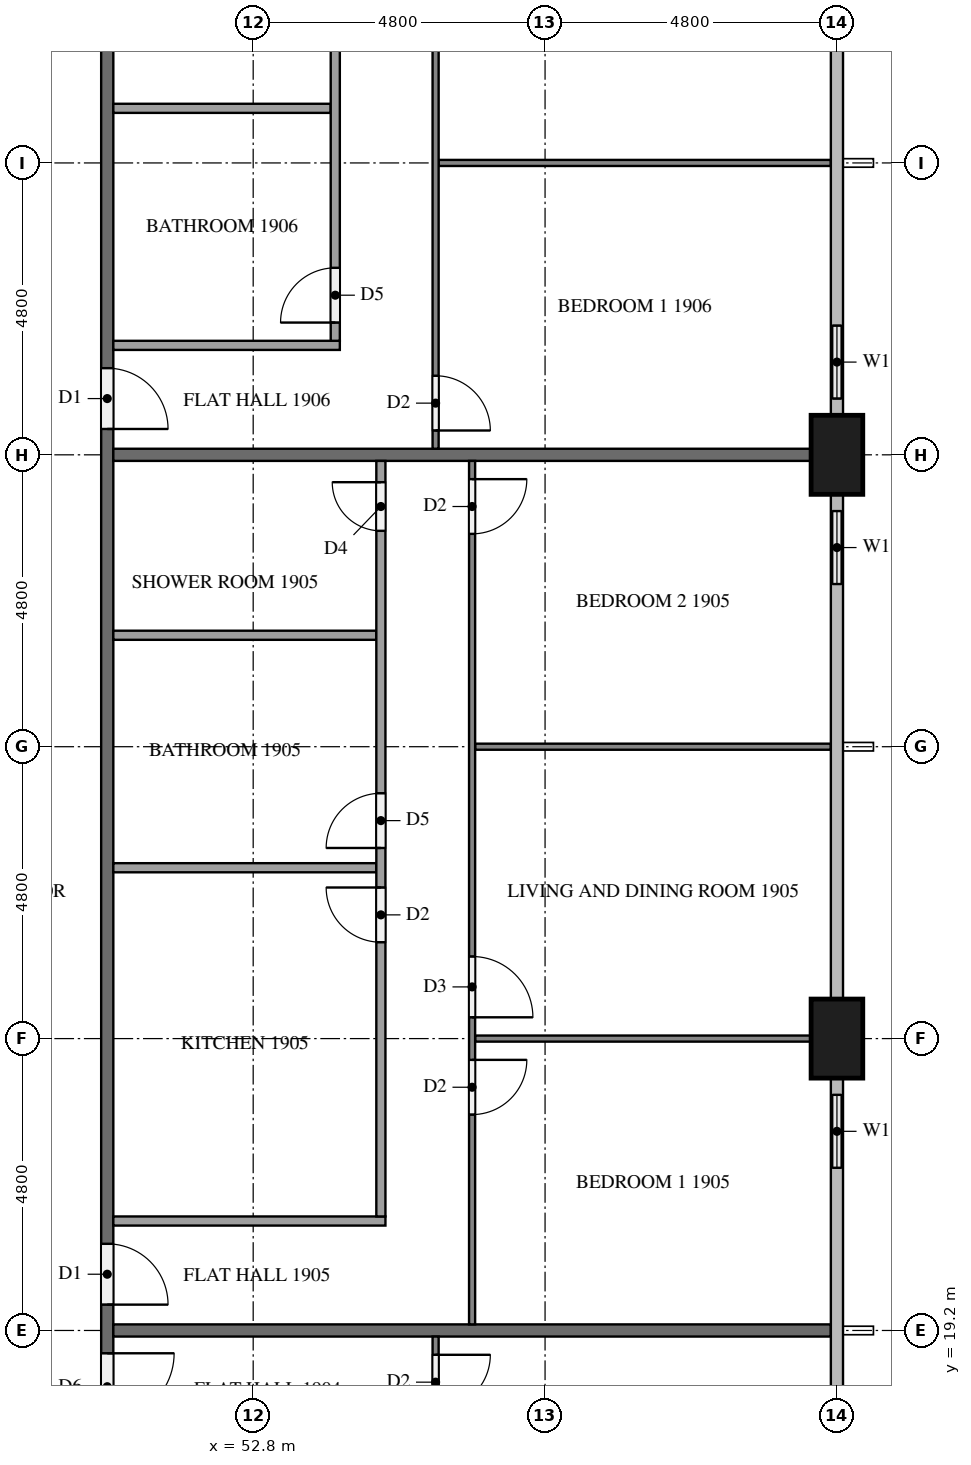
"""IFC4 building model, lengths in metres.
Left out: names, types, materials, properties, quantities, classifications, styles, units other than length and angle.
Written with IfcOpenShell. Run it as: python <this file> out.ifc"""

import sys

from ifc_helpers import new_model, si_unit, direction, frame, frame_2d, origin, origin_2d, place, context, subcontext, project, spatial, rectangle, extrude, element, fill, save


model = new_model("IFC4")
c1 = context("Model", 3, precision=1e-05, world=origin(), true_north=direction((0.0, 1.0)))
c2 = subcontext(c1, "Body", "Model", "MODEL_VIEW")
j1 = project(units=[si_unit("LENGTHUNIT", "METRE"), si_unit("PLANEANGLEUNIT", "RADIAN")], contexts=[c1])
p1 = place(None, origin())
s1 = spatial("IfcSite", under=j1, at=p1, CompositionType="ELEMENT")
p2 = place(p1, origin())
s2 = spatial("IfcBuilding", under=s1, at=p2, CompositionType="ELEMENT")
p3 = place(p2, frame((0.0, 0.0, 76.8)))
s3 = spatial("IfcBuildingStorey", under=s2, at=p3, CompositionType="ELEMENT", Elevation=76.8)
for number, where, z_axis, x_axis in (
    (1, (62.4, 24.0, 0.0), (0.0, 0.0, 1.0), (0.0, 1.0, 0.0)),
    (2, (62.4, 33.6, 0.0), (0.0, 0.0, 1.0), (0.0, 1.0, 0.0)),
):
    element("IfcColumn", number, at=place(p3, frame(where, z_axis=z_axis, x_axis=x_axis)), inside=s3, PredefinedType="COLUMN", context=c2, shape_type="SweptSolid", body=[
        extrude(rectangle(XDim=1.3, YDim=0.85, at=origin_2d()), origin(), (0.0, 0.0, 1.0), 3.2),
    ])
p4 = place(p3, frame((62.4, 21.6, 0.0), z_axis=(0.0, 0.0, 1.0), x_axis=(0.0, 1.0, 0.0)))
e3 = element("IfcWall", 3, at=p4, inside=s3, PredefinedType="SOLIDWALL", context=c2, shape_type="SweptSolid", body=[
    extrude(rectangle(XDim=1.75, YDim=0.15, at=frame_2d((0.875, 0.0))), origin(), (0.0, 0.0, 1.0), 3.2),
])
p5 = place(p4, frame((0.275, 0.0, 0.9)))
e4 = element("IfcOpeningElement", 4, at=p5, cuts=e3, PredefinedType="OPENING", context=c2, shape_type="SweptSolid", body=[
    extrude(rectangle(XDim=1.2, YDim=1.4, at=frame_2d((0.6, 0.7))), frame((0.0, 0.085, 0.0), z_axis=(0.0, -1.0, 0.0), x_axis=(1.0, 0.0, 0.0)), (0.0, 0.0, 1.0), 0.17),
])
p6 = place(p3, frame((62.4, 31.2, 0.0), z_axis=(0.0, 0.0, 1.0), x_axis=(0.0, 1.0, 0.0)))
e5 = element("IfcWall", 5, at=p6, inside=s3, PredefinedType="SOLIDWALL", context=c2, shape_type="SweptSolid", body=[
    extrude(rectangle(XDim=1.75, YDim=0.15, at=frame_2d((0.875, 0.0))), origin(), (0.0, 0.0, 1.0), 3.2),
])
p7 = place(p6, frame((0.275, 0.0, 0.9)))
e6 = element("IfcOpeningElement", 6, at=p7, cuts=e5, PredefinedType="OPENING", context=c2, shape_type="SweptSolid", body=[
    extrude(rectangle(XDim=1.2, YDim=1.4, at=frame_2d((0.6, 0.7))), frame((0.0, 0.085, 0.0), z_axis=(0.0, -1.0, 0.0), x_axis=(1.0, 0.0, 0.0)), (0.0, 0.0, 1.0), 0.17),
])
p8 = place(p3, frame((62.4, 34.25, 0.0), z_axis=(0.0, 0.0, 1.0), x_axis=(0.0, 1.0, 0.0)))
e7 = element("IfcWall", 7, at=p8, inside=s3, PredefinedType="SOLIDWALL", context=c2, shape_type="SweptSolid", body=[
    extrude(rectangle(XDim=1.75, YDim=0.15, at=frame_2d((0.875, 0.0))), origin(), (0.0, 0.0, 1.0), 3.2),
])
p9 = place(p8, frame((0.275, 0.0, 0.9)))
e8 = element("IfcOpeningElement", 8, at=p9, cuts=e7, PredefinedType="OPENING", context=c2, shape_type="SweptSolid", body=[
    extrude(rectangle(XDim=1.2, YDim=1.4, at=frame_2d((0.6, 0.7))), frame((0.0, 0.085, 0.0), z_axis=(0.0, -1.0, 0.0), x_axis=(1.0, 0.0, 0.0)), (0.0, 0.0, 1.0), 0.17),
])
p10 = place(p3, frame((50.4, 40.7, 0.0), z_axis=(0.0, 0.0, 1.0), x_axis=(0.0, -1.0, 0.0)))
e9 = element("IfcWall", 9, at=p10, inside=s3, PredefinedType="PARTITIONING", context=c2, shape_type="SweptSolid", body=[
    extrude(rectangle(XDim=28.6, YDim=0.2, at=frame_2d((14.3, 0.0))), origin(), (0.0, 0.0, 1.0), 3.2),
])
p11 = place(p10, frame((21.875, 0.0, 0.0)))
e10 = element("IfcOpeningElement", 10, at=p11, cuts=e9, PredefinedType="OPENING", context=c2, shape_type="SweptSolid", body=[
    extrude(rectangle(XDim=1.1, YDim=2.1, at=frame_2d((0.55, 1.05))), frame((0.0, 0.11, 0.0), z_axis=(0.0, -1.0, 0.0), x_axis=(1.0, 0.0, 0.0)), (0.0, 0.0, 1.0), 0.22),
])
p12 = place(p10, frame((20.075, 0.0, 0.0)))
e11 = element("IfcOpeningElement", 11, at=p12, cuts=e9, PredefinedType="OPENING", context=c2, shape_type="SweptSolid", body=[
    extrude(rectangle(XDim=1.0, YDim=2.1, at=frame_2d((0.5, 1.05))), frame((0.0, 0.11, 0.0), z_axis=(0.0, -1.0, 0.0), x_axis=(1.0, 0.0, 0.0)), (0.0, 0.0, 1.0), 0.22),
])
p13 = place(p10, frame((5.675, 0.0, 0.0)))
e12 = element("IfcOpeningElement", 12, at=p13, cuts=e9, PredefinedType="OPENING", context=c2, shape_type="SweptSolid", body=[
    extrude(rectangle(XDim=1.0, YDim=2.1, at=frame_2d((0.5, 1.05))), frame((0.0, 0.11, 0.0), z_axis=(0.0, -1.0, 0.0), x_axis=(1.0, 0.0, 0.0)), (0.0, 0.0, 1.0), 0.22),
])
p14 = place(p3, frame((50.5, 19.2, 0.0), z_axis=(0.0, 0.0, 1.0), x_axis=(1.0, 0.0, 0.0)))
e13 = element("IfcWall", 13, at=p14, inside=s3, PredefinedType="PARTITIONING", context=c2, shape_type="SweptSolid", body=[
    extrude(rectangle(XDim=11.8, YDim=0.2, at=frame_2d((5.9, 0.0))), origin(), (0.0, 0.0, 1.0), 3.2),
])
p15 = place(p3, frame((50.5, 33.6, 0.0), z_axis=(0.0, 0.0, 1.0), x_axis=(1.0, 0.0, 0.0)))
e14 = element("IfcWall", 14, at=p15, inside=s3, PredefinedType="PARTITIONING", context=c2, shape_type="SweptSolid", body=[
    extrude(rectangle(XDim=11.475, YDim=0.2, at=frame_2d((5.738, 0.0))), origin(), (0.0, 0.0, 1.0), 3.2),
])
p16 = place(p3, frame((55.8, 19.1, 0.0), z_axis=(0.0, 0.0, 1.0), x_axis=(0.0, -1.0, 0.0)))
e15 = element("IfcWall", 15, at=p16, inside=s3, PredefinedType="PARTITIONING", context=c2, shape_type="SweptSolid", body=[
    extrude(rectangle(XDim=19.0, YDim=0.1, at=frame_2d((9.5, 0.0))), origin(), (0.0, 0.0, 1.0), 3.2),
])
p17 = place(p16, frame((0.3, 0.0, 0.0)))
e16 = element("IfcOpeningElement", 16, at=p17, cuts=e15, PredefinedType="OPENING", context=c2, shape_type="SweptSolid", body=[
    extrude(rectangle(XDim=0.9, YDim=2.1, at=frame_2d((0.45, 1.05))), frame((0.0, 0.06, 0.0), z_axis=(0.0, -1.0, 0.0), x_axis=(1.0, 0.0, 0.0)), (0.0, 0.0, 1.0), 0.12),
])
p18 = place(p16, frame((8.15, 0.0, 0.0)))
e17 = element("IfcOpeningElement", 17, at=p18, cuts=e15, PredefinedType="OPENING", context=c2, shape_type="SweptSolid", body=[
    extrude(rectangle(XDim=1.0, YDim=2.1, at=frame_2d((0.5, 1.05))), frame((0.0, 0.06, 0.0), z_axis=(0.0, -1.0, 0.0), x_axis=(1.0, 0.0, 0.0)), (0.0, 0.0, 1.0), 0.12),
])
p19 = place(p16, frame((9.85, 0.0, 0.0)))
e18 = element("IfcOpeningElement", 18, at=p19, cuts=e15, PredefinedType="OPENING", context=c2, shape_type="SweptSolid", body=[
    extrude(rectangle(XDim=0.9, YDim=2.1, at=frame_2d((0.45, 1.05))), frame((0.0, 0.06, 0.0), z_axis=(0.0, -1.0, 0.0), x_axis=(1.0, 0.0, 0.0)), (0.0, 0.0, 1.0), 0.12),
])
p20 = place(p16, frame((17.6, 0.0, 0.0)))
e19 = element("IfcOpeningElement", 19, at=p20, cuts=e15, PredefinedType="OPENING", context=c2, shape_type="SweptSolid", body=[
    extrude(rectangle(XDim=0.9, YDim=2.1, at=frame_2d((0.45, 1.05))), frame((0.0, 0.06, 0.0), z_axis=(0.0, -1.0, 0.0), x_axis=(1.0, 0.0, 0.0)), (0.0, 0.0, 1.0), 0.12),
])
p21 = place(p3, frame((56.45, 24.0, 0.0), z_axis=(0.0, 0.0, 1.0), x_axis=(1.0, 0.0, 0.0)))
e20 = element("IfcWall", 20, at=p21, inside=s3, PredefinedType="PARTITIONING", context=c2, shape_type="SweptSolid", body=[
    extrude(rectangle(XDim=5.525, YDim=0.1, at=frame_2d((2.763, 0.0))), origin(), (0.0, 0.0, 1.0), 3.2),
])
p22 = place(p3, frame((56.45, 28.8, 0.0), z_axis=(0.0, 0.0, 1.0), x_axis=(1.0, 0.0, 0.0)))
e21 = element("IfcWall", 21, at=p22, inside=s3, PredefinedType="PARTITIONING", context=c2, shape_type="SweptSolid", body=[
    extrude(rectangle(XDim=5.85, YDim=0.1, at=frame_2d((2.925, 0.0))), origin(), (0.0, 0.0, 1.0), 3.2),
])
p23 = place(p3, frame((56.4, 33.5, 0.0), z_axis=(0.0, 0.0, 1.0), x_axis=(0.0, -1.0, 0.0)))
e22 = element("IfcWall", 22, at=p23, inside=s3, PredefinedType="PARTITIONING", context=c2, shape_type="SweptSolid", body=[
    extrude(rectangle(XDim=14.2, YDim=0.1, at=frame_2d((7.1, 0.0))), origin(), (0.0, 0.0, 1.0), 3.2),
])
p24 = place(p23, frame((9.85, 0.0, 0.0)))
e23 = element("IfcOpeningElement", 23, at=p24, cuts=e22, PredefinedType="OPENING", context=c2, shape_type="SweptSolid", body=[
    extrude(rectangle(XDim=0.9, YDim=2.1, at=frame_2d((0.45, 1.05))), frame((0.0, 0.06, 0.0), z_axis=(0.0, -1.0, 0.0), x_axis=(1.0, 0.0, 0.0)), (0.0, 0.0, 1.0), 0.12),
])
p25 = place(p23, frame((8.15, 0.0, 0.0)))
e24 = element("IfcOpeningElement", 24, at=p25, cuts=e22, PredefinedType="OPENING", context=c2, shape_type="SweptSolid", body=[
    extrude(rectangle(XDim=1.0, YDim=2.1, at=frame_2d((0.5, 1.05))), frame((0.0, 0.06, 0.0), z_axis=(0.0, -1.0, 0.0), x_axis=(1.0, 0.0, 0.0)), (0.0, 0.0, 1.0), 0.12),
])
p26 = place(p23, frame((0.3, 0.0, 0.0)))
e25 = element("IfcOpeningElement", 25, at=p26, cuts=e22, PredefinedType="OPENING", context=c2, shape_type="SweptSolid", body=[
    extrude(rectangle(XDim=0.9, YDim=2.1, at=frame_2d((0.45, 1.05))), frame((0.0, 0.06, 0.0), z_axis=(0.0, -1.0, 0.0), x_axis=(1.0, 0.0, 0.0)), (0.0, 0.0, 1.0), 0.12),
])
for number, where, z_axis, x_axis in (
    (26, (50.5, 26.81, 0.0), (0.0, 0.0, 1.0), (1.0, 0.0, 0.0)),
    (27, (50.5, 30.633, 0.0), (0.0, 0.0, 1.0), (1.0, 0.0, 0.0)),
):
    element("IfcWall", number, at=place(p3, frame(where, z_axis=z_axis, x_axis=x_axis)), inside=s3, PredefinedType="PARTITIONING", context=c2, shape_type="SweptSolid", body=[
        extrude(rectangle(XDim=4.325, YDim=0.15, at=frame_2d((2.163, 0.0))), origin(), (0.0, 0.0, 1.0), 3.2),
    ])
p27 = place(p3, frame((50.5, 21.0, 0.0), z_axis=(0.0, 0.0, 1.0), x_axis=(1.0, 0.0, 0.0)))
e28 = element("IfcWall", 28, at=p27, inside=s3, PredefinedType="PARTITIONING", context=c2, shape_type="SweptSolid", body=[
    extrude(rectangle(XDim=4.475, YDim=0.15, at=frame_2d((2.238, 0.0))), origin(), (0.0, 0.0, 1.0), 3.2),
])
p28 = place(p3, frame((54.9, 21.075, 0.0), z_axis=(0.0, 0.0, 1.0), x_axis=(0.0, 1.0, 0.0)))
e29 = element("IfcWall", 29, at=p28, inside=s3, PredefinedType="PARTITIONING", context=c2, shape_type="SweptSolid", body=[
    extrude(rectangle(XDim=12.425, YDim=0.15, at=frame_2d((6.212, 0.0))), origin(), (0.0, 0.0, 1.0), 3.2),
])
p29 = place(p28, frame((4.51, 0.0, 0.0)))
e30 = element("IfcOpeningElement", 30, at=p29, cuts=e29, PredefinedType="OPENING", context=c2, shape_type="SweptSolid", body=[
    extrude(rectangle(XDim=0.9, YDim=2.1, at=frame_2d((0.45, 1.05))), frame((0.0, 0.085, 0.0), z_axis=(0.0, -1.0, 0.0), x_axis=(1.0, 0.0, 0.0)), (0.0, 0.0, 1.0), 0.17),
])
p30 = place(p28, frame((6.06, 0.0, 0.0)))
e31 = element("IfcOpeningElement", 31, at=p30, cuts=e29, PredefinedType="OPENING", context=c2, shape_type="SweptSolid", body=[
    extrude(rectangle(XDim=0.9, YDim=2.1, at=frame_2d((0.45, 1.05))), frame((0.0, 0.085, 0.0), z_axis=(0.0, -1.0, 0.0), x_axis=(1.0, 0.0, 0.0)), (0.0, 0.0, 1.0), 0.17),
])
p31 = place(p28, frame((11.275, 0.0, 0.0)))
e32 = element("IfcOpeningElement", 32, at=p31, cuts=e29, PredefinedType="OPENING", context=c2, shape_type="SweptSolid", body=[
    extrude(rectangle(XDim=0.8, YDim=2.1, at=frame_2d((0.4, 1.05))), frame((0.0, 0.085, 0.0), z_axis=(0.0, -1.0, 0.0), x_axis=(1.0, 0.0, 0.0)), (0.0, 0.0, 1.0), 0.17),
])
p32 = place(p3, frame((55.85, 38.4, 0.0), z_axis=(0.0, 0.0, 1.0), x_axis=(1.0, 0.0, 0.0)))
e33 = element("IfcWall", 33, at=p32, inside=s3, PredefinedType="PARTITIONING", context=c2, shape_type="SweptSolid", body=[
    extrude(rectangle(XDim=6.45, YDim=0.1, at=frame_2d((3.225, 0.0))), origin(), (0.0, 0.0, 1.0), 3.2),
])
p33 = place(p3, frame((55.8, 47.9, 0.0), z_axis=(0.0, 0.0, 1.0), x_axis=(0.0, -1.0, 0.0)))
e34 = element("IfcWall", 34, at=p33, inside=s3, PredefinedType="PARTITIONING", context=c2, shape_type="SweptSolid", body=[
    extrude(rectangle(XDim=14.2, YDim=0.1, at=frame_2d((7.1, 0.0))), origin(), (0.0, 0.0, 1.0), 3.2),
])
p34 = place(p33, frame((13.0, 0.0, 0.0)))
e35 = element("IfcOpeningElement", 35, at=p34, cuts=e34, PredefinedType="OPENING", context=c2, shape_type="SweptSolid", body=[
    extrude(rectangle(XDim=0.9, YDim=2.1, at=frame_2d((0.45, 1.05))), frame((0.0, 0.06, 0.0), z_axis=(0.0, -1.0, 0.0), x_axis=(1.0, 0.0, 0.0)), (0.0, 0.0, 1.0), 0.12),
])
p35 = place(p33, frame((5.05, 0.0, 0.0)))
e36 = element("IfcOpeningElement", 36, at=p35, cuts=e34, PredefinedType="OPENING", context=c2, shape_type="SweptSolid", body=[
    extrude(rectangle(XDim=0.9, YDim=2.1, at=frame_2d((0.45, 1.05))), frame((0.0, 0.06, 0.0), z_axis=(0.0, -1.0, 0.0), x_axis=(1.0, 0.0, 0.0)), (0.0, 0.0, 1.0), 0.12),
])
p36 = place(p33, frame((3.35, 0.0, 0.0)))
e37 = element("IfcOpeningElement", 37, at=p36, cuts=e34, PredefinedType="OPENING", context=c2, shape_type="SweptSolid", body=[
    extrude(rectangle(XDim=1.0, YDim=2.1, at=frame_2d((0.5, 1.05))), frame((0.0, 0.06, 0.0), z_axis=(0.0, -1.0, 0.0), x_axis=(1.0, 0.0, 0.0)), (0.0, 0.0, 1.0), 0.12),
])
p37 = place(p3, frame((50.5, 39.298, 0.0), z_axis=(0.0, 0.0, 1.0), x_axis=(1.0, 0.0, 0.0)))
e38 = element("IfcWall", 38, at=p37, inside=s3, PredefinedType="PARTITIONING", context=c2, shape_type="SweptSolid", body=[
    extrude(rectangle(XDim=3.575, YDim=0.15, at=frame_2d((1.788, 0.0))), origin(), (0.0, 0.0, 1.0), 3.2),
])
p38 = place(p3, frame((50.5, 35.4, 0.0), z_axis=(0.0, 0.0, 1.0), x_axis=(1.0, 0.0, 0.0)))
e39 = element("IfcWall", 39, at=p38, inside=s3, PredefinedType="PARTITIONING", context=c2, shape_type="SweptSolid", body=[
    extrude(rectangle(XDim=3.725, YDim=0.15, at=frame_2d((1.863, 0.0))), origin(), (0.0, 0.0, 1.0), 3.2),
])
p39 = place(p3, frame((54.15, 35.475, 0.0), z_axis=(0.0, 0.0, 1.0), x_axis=(0.0, 1.0, 0.0)))
e40 = element("IfcWall", 40, at=p39, inside=s3, PredefinedType="PARTITIONING", context=c2, shape_type="SweptSolid", body=[
    extrude(rectangle(XDim=12.425, YDim=0.15, at=frame_2d((6.212, 0.0))), origin(), (0.0, 0.0, 1.0), 3.2),
])
p40 = place(p39, frame((0.3, 0.0, 0.0)))
e41 = element("IfcOpeningElement", 41, at=p40, cuts=e40, PredefinedType="OPENING", context=c2, shape_type="SweptSolid", body=[
    extrude(rectangle(XDim=0.9, YDim=2.1, at=frame_2d((0.45, 1.05))), frame((0.0, 0.085, 0.0), z_axis=(0.0, -1.0, 0.0), x_axis=(1.0, 0.0, 0.0)), (0.0, 0.0, 1.0), 0.17),
])
p41 = place(p39, frame((8.333, 0.0, 0.0)))
e42 = element("IfcOpeningElement", 42, at=p41, cuts=e40, PredefinedType="OPENING", context=c2, shape_type="SweptSolid", body=[
    extrude(rectangle(XDim=0.9, YDim=2.1, at=frame_2d((0.45, 1.05))), frame((0.0, 0.085, 0.0), z_axis=(0.0, -1.0, 0.0), x_axis=(1.0, 0.0, 0.0)), (0.0, 0.0, 1.0), 0.17),
])
p42 = place(p39, frame((9.883, 0.0, 0.0)))
e43 = element("IfcOpeningElement", 43, at=p42, cuts=e40, PredefinedType="OPENING", context=c2, shape_type="SweptSolid", body=[
    extrude(rectangle(XDim=0.8, YDim=2.1, at=frame_2d((0.4, 1.05))), frame((0.0, 0.085, 0.0), z_axis=(0.0, -1.0, 0.0), x_axis=(1.0, 0.0, 0.0)), (0.0, 0.0, 1.0), 0.17),
])
p43 = place(p5, origin())
e44 = element("IfcWindow", 44, at=p43, inside=s3, PartitioningType="SINGLE_PANEL", PredefinedType="WINDOW", context=c2, shape_type="SweptSolid", body=[
    extrude(rectangle(XDim=1.2, YDim=1.4, at=frame_2d((0.6, 0.7))), frame((0.0, 0.03, 0.0), z_axis=(0.0, -1.0, 0.0), x_axis=(1.0, 0.0, 0.0)), (0.0, 0.0, 1.0), 0.06),
])
fill(e4, e44)
p44 = place(p7, origin())
e45 = element("IfcWindow", 45, at=p44, inside=s3, PartitioningType="SINGLE_PANEL", PredefinedType="WINDOW", context=c2, shape_type="SweptSolid", body=[
    extrude(rectangle(XDim=1.2, YDim=1.4, at=frame_2d((0.6, 0.7))), frame((0.0, 0.03, 0.0), z_axis=(0.0, -1.0, 0.0), x_axis=(1.0, 0.0, 0.0)), (0.0, 0.0, 1.0), 0.06),
])
fill(e6, e45)
p45 = place(p9, origin())
e46 = element("IfcWindow", 46, at=p45, inside=s3, PartitioningType="SINGLE_PANEL", PredefinedType="WINDOW", context=c2, shape_type="SweptSolid", body=[
    extrude(rectangle(XDim=1.2, YDim=1.4, at=frame_2d((0.6, 0.7))), frame((0.0, 0.03, 0.0), z_axis=(0.0, -1.0, 0.0), x_axis=(1.0, 0.0, 0.0)), (0.0, 0.0, 1.0), 0.06),
])
fill(e8, e46)
p46 = place(p11, origin())
e47 = element("IfcDoor", 47, at=p46, inside=s3, OperationType="SINGLE_SWING_LEFT", PredefinedType="DOOR", context=c2, shape_type="SweptSolid", body=[
    extrude(rectangle(XDim=1.1, YDim=2.1, at=frame_2d((0.55, 1.05))), frame((0.0, 0.025, 0.0), z_axis=(0.0, -1.0, 0.0), x_axis=(1.0, 0.0, 0.0)), (0.0, 0.0, 1.0), 0.05),
])
fill(e10, e47)
p47 = place(p12, origin())
e48 = element("IfcDoor", 48, at=p47, inside=s3, OperationType="SINGLE_SWING_RIGHT", PredefinedType="DOOR", context=c2, shape_type="SweptSolid", body=[
    extrude(rectangle(XDim=1.0, YDim=2.1, at=frame_2d((0.5, 1.05))), frame((0.0, 0.025, 0.0), z_axis=(0.0, -1.0, 0.0), x_axis=(1.0, 0.0, 0.0)), (0.0, 0.0, 1.0), 0.05),
])
fill(e11, e48)
p48 = place(p13, origin())
e49 = element("IfcDoor", 49, at=p48, inside=s3, OperationType="SINGLE_SWING_RIGHT", PredefinedType="DOOR", context=c2, shape_type="SweptSolid", body=[
    extrude(rectangle(XDim=1.0, YDim=2.1, at=frame_2d((0.5, 1.05))), frame((0.0, 0.025, 0.0), z_axis=(0.0, -1.0, 0.0), x_axis=(1.0, 0.0, 0.0)), (0.0, 0.0, 1.0), 0.05),
])
fill(e12, e49)
p49 = place(p17, origin())
e50 = element("IfcDoor", 50, at=p49, inside=s3, OperationType="SINGLE_SWING_LEFT", PredefinedType="DOOR", context=c2, shape_type="SweptSolid", body=[
    extrude(rectangle(XDim=0.9, YDim=2.1, at=frame_2d((0.45, 1.05))), frame((0.0, 0.025, 0.0), z_axis=(0.0, -1.0, 0.0), x_axis=(1.0, 0.0, 0.0)), (0.0, 0.0, 1.0), 0.05),
])
fill(e16, e50)
p50 = place(p24, origin())
e51 = element("IfcDoor", 51, at=p50, inside=s3, OperationType="SINGLE_SWING_LEFT", PredefinedType="DOOR", context=c2, shape_type="SweptSolid", body=[
    extrude(rectangle(XDim=0.9, YDim=2.1, at=frame_2d((0.45, 1.05))), frame((0.0, 0.025, 0.0), z_axis=(0.0, -1.0, 0.0), x_axis=(1.0, 0.0, 0.0)), (0.0, 0.0, 1.0), 0.05),
])
fill(e23, e51)
p51 = place(p25, origin())
e52 = element("IfcDoor", 52, at=p51, inside=s3, OperationType="SINGLE_SWING_RIGHT", PredefinedType="DOOR", context=c2, shape_type="SweptSolid", body=[
    extrude(rectangle(XDim=1.0, YDim=2.1, at=frame_2d((0.5, 1.05))), frame((0.0, 0.025, 0.0), z_axis=(0.0, -1.0, 0.0), x_axis=(1.0, 0.0, 0.0)), (0.0, 0.0, 1.0), 0.05),
])
fill(e24, e52)
p52 = place(p26, origin())
e53 = element("IfcDoor", 53, at=p52, inside=s3, OperationType="SINGLE_SWING_LEFT", PredefinedType="DOOR", context=c2, shape_type="SweptSolid", body=[
    extrude(rectangle(XDim=0.9, YDim=2.1, at=frame_2d((0.45, 1.05))), frame((0.0, 0.025, 0.0), z_axis=(0.0, -1.0, 0.0), x_axis=(1.0, 0.0, 0.0)), (0.0, 0.0, 1.0), 0.05),
])
fill(e25, e53)
p53 = place(p29, origin())
e54 = element("IfcDoor", 54, at=p53, inside=s3, OperationType="SINGLE_SWING_RIGHT", PredefinedType="DOOR", context=c2, shape_type="SweptSolid", body=[
    extrude(rectangle(XDim=0.9, YDim=2.1, at=frame_2d((0.45, 1.05))), frame((0.0, 0.025, 0.0), z_axis=(0.0, -1.0, 0.0), x_axis=(1.0, 0.0, 0.0)), (0.0, 0.0, 1.0), 0.05),
])
fill(e30, e54)
p54 = place(p30, origin())
e55 = element("IfcDoor", 55, at=p54, inside=s3, OperationType="SINGLE_SWING_LEFT", PredefinedType="DOOR", context=c2, shape_type="SweptSolid", body=[
    extrude(rectangle(XDim=0.9, YDim=2.1, at=frame_2d((0.45, 1.05))), frame((0.0, 0.025, 0.0), z_axis=(0.0, -1.0, 0.0), x_axis=(1.0, 0.0, 0.0)), (0.0, 0.0, 1.0), 0.05),
])
fill(e31, e55)
p55 = place(p31, origin())
e56 = element("IfcDoor", 56, at=p55, inside=s3, OperationType="SINGLE_SWING_RIGHT", PredefinedType="DOOR", context=c2, shape_type="SweptSolid", body=[
    extrude(rectangle(XDim=0.8, YDim=2.1, at=frame_2d((0.4, 1.05))), frame((0.0, 0.025, 0.0), z_axis=(0.0, -1.0, 0.0), x_axis=(1.0, 0.0, 0.0)), (0.0, 0.0, 1.0), 0.05),
])
fill(e32, e56)
p56 = place(p34, origin())
e57 = element("IfcDoor", 57, at=p56, inside=s3, OperationType="SINGLE_SWING_RIGHT", PredefinedType="DOOR", context=c2, shape_type="SweptSolid", body=[
    extrude(rectangle(XDim=0.9, YDim=2.1, at=frame_2d((0.45, 1.05))), frame((0.0, 0.025, 0.0), z_axis=(0.0, -1.0, 0.0), x_axis=(1.0, 0.0, 0.0)), (0.0, 0.0, 1.0), 0.05),
])
fill(e35, e57)
p57 = place(p40, origin())
e58 = element("IfcDoor", 58, at=p57, inside=s3, OperationType="SINGLE_SWING_LEFT", PredefinedType="DOOR", context=c2, shape_type="SweptSolid", body=[
    extrude(rectangle(XDim=0.9, YDim=2.1, at=frame_2d((0.45, 1.05))), frame((0.0, 0.025, 0.0), z_axis=(0.0, -1.0, 0.0), x_axis=(1.0, 0.0, 0.0)), (0.0, 0.0, 1.0), 0.05),
])
fill(e41, e58)
save(model, sys.argv[1])
